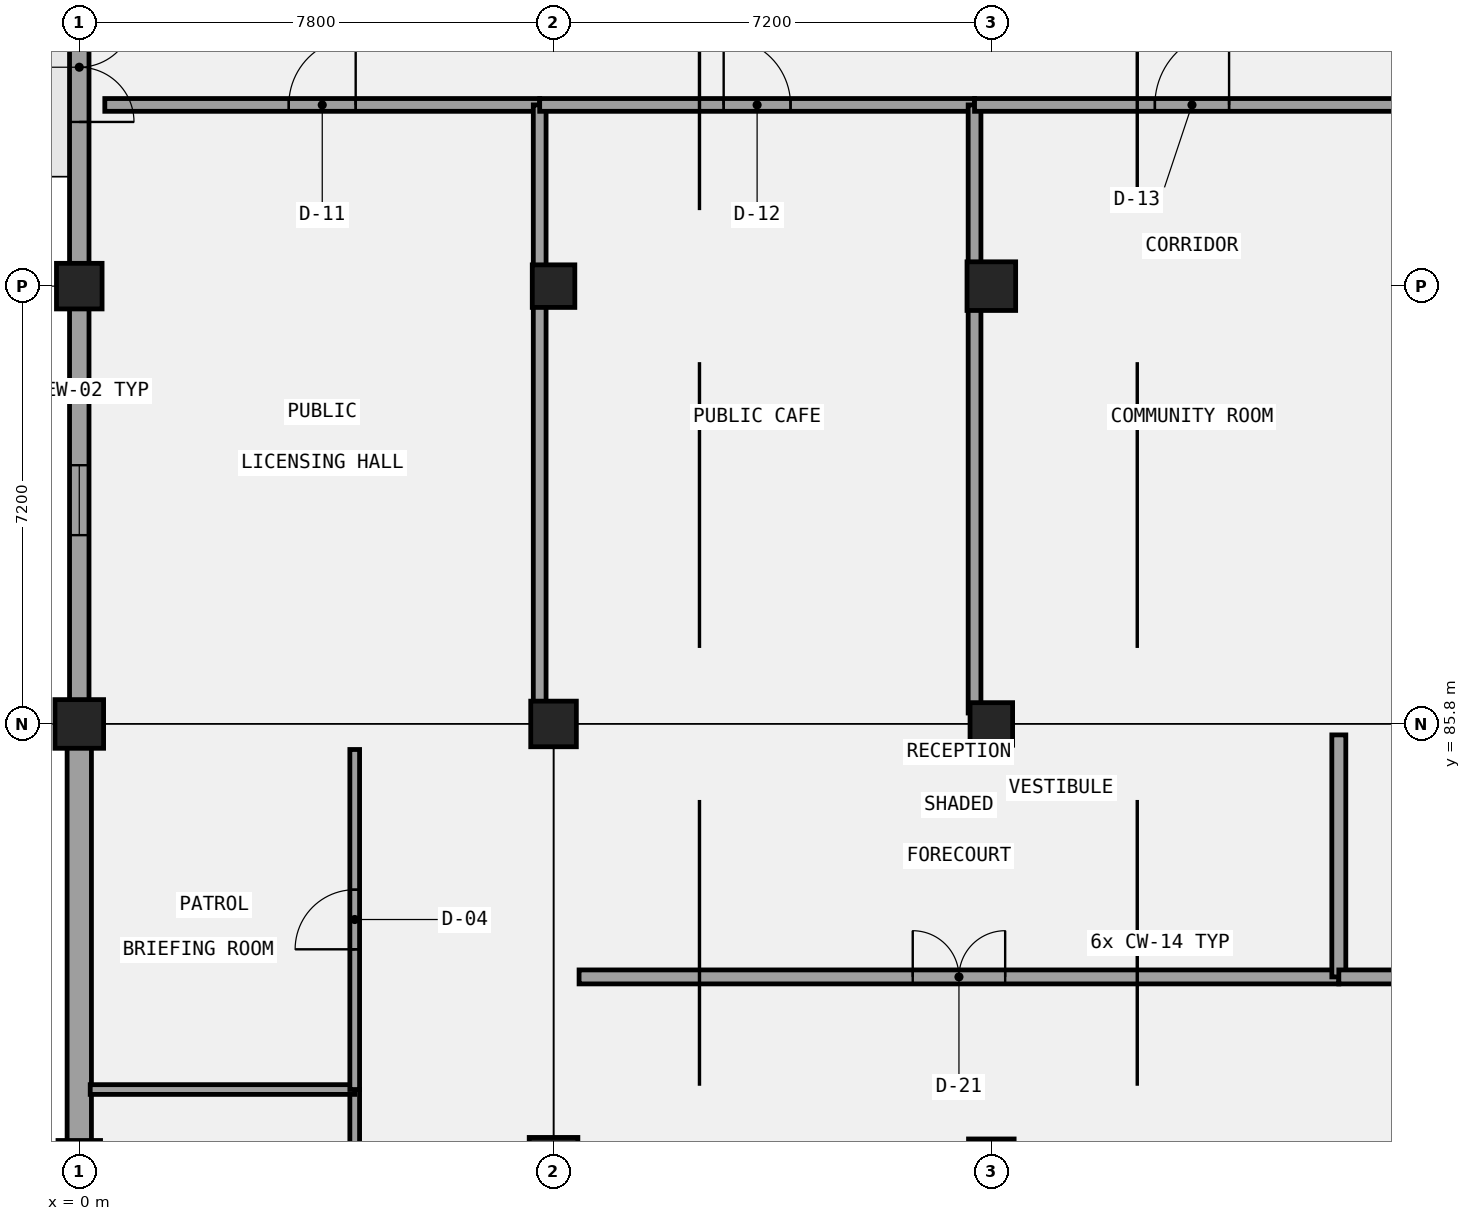
"""IFC4 building model, lengths in metres.
Left out: names, types, materials, properties, quantities, classifications, styles, units other than length and angle.
Written with IfcOpenShell. Run it as: python <this file> out.ifc"""

import sys

from ifc_helpers import new_model, si_unit, direction, frame, frame_2d, origin, origin_2d, place, context, subcontext, project, spatial, rectangle, extrude, element, fill, save


model = new_model("IFC4")
c1 = context("Model", 3, precision=1e-05, world=origin(), true_north=direction((0.0, 1.0)))
c2 = subcontext(c1, "Body", "Model", "MODEL_VIEW")
j1 = project(units=[si_unit("LENGTHUNIT", "METRE"), si_unit("PLANEANGLEUNIT", "RADIAN")], contexts=[c1])
p1 = place(None, origin())
s1 = spatial("IfcSite", under=j1, at=p1, CompositionType="ELEMENT")
p2 = place(p1, origin())
s2 = spatial("IfcBuilding", under=s1, at=p2, CompositionType="ELEMENT")
p3 = place(p2, origin())
s3 = spatial("IfcBuildingStorey", under=s2, at=p3, CompositionType="ELEMENT", Elevation=0.0)
p4 = place(p3, frame((0.0, 78.6, -0.32), z_axis=(0.0, 0.0, 1.0), x_axis=(1.0, 0.0, 0.0)))
e1 = element("IfcColumn", 1, at=p4, inside=s3, PredefinedType="COLUMN", context=c2, shape_type="SweptSolid", body=[
    extrude(rectangle(XDim=0.7, YDim=0.7, at=origin_2d()), origin(), (0.0, 0.0, 1.0), 5.72),
])
p5 = place(p3, frame((0.0, 85.8, -0.32), z_axis=(0.0, 0.0, 1.0), x_axis=(1.0, 0.0, 0.0)))
e2 = element("IfcColumn", 2, at=p5, inside=s3, PredefinedType="COLUMN", context=c2, shape_type="SweptSolid", body=[
    extrude(rectangle(XDim=0.8, YDim=0.8, at=origin_2d()), origin(), (0.0, 0.0, 1.0), 5.72),
])
p6 = place(p3, frame((0.0, 93.0, -0.32), z_axis=(0.0, 0.0, 1.0), x_axis=(1.0, 0.0, 0.0)))
e3 = element("IfcColumn", 3, at=p6, inside=s3, PredefinedType="COLUMN", context=c2, shape_type="SweptSolid", body=[
    extrude(rectangle(XDim=0.75, YDim=0.75, at=origin_2d()), origin(), (0.0, 0.0, 1.0), 5.72),
])
p7 = place(p3, frame((7.8, 78.6, 0.0), z_axis=(0.0, 0.0, 1.0), x_axis=(1.0, 0.0, 0.0)))
e4 = element("IfcColumn", 4, at=p7, inside=s3, PredefinedType="COLUMN", context=c2, shape_type="SweptSolid", body=[
    extrude(rectangle(XDim=0.8, YDim=0.8, at=origin_2d()), origin(), (0.0, 0.0, 1.0), 5.4),
])
p8 = place(p3, frame((7.8, 85.8, 0.0), z_axis=(0.0, 0.0, 1.0), x_axis=(1.0, 0.0, 0.0)))
e5 = element("IfcColumn", 5, at=p8, inside=s3, PredefinedType="COLUMN", context=c2, shape_type="SweptSolid", body=[
    extrude(rectangle(XDim=0.75, YDim=0.75, at=origin_2d()), origin(), (0.0, 0.0, 1.0), 5.4),
])
p9 = place(p3, frame((7.8, 93.0, -0.32), z_axis=(0.0, 0.0, 1.0), x_axis=(1.0, 0.0, 0.0)))
e6 = element("IfcColumn", 6, at=p9, inside=s3, PredefinedType="COLUMN", context=c2, shape_type="SweptSolid", body=[
    extrude(rectangle(XDim=0.7, YDim=0.7, at=origin_2d()), origin(), (0.0, 0.0, 1.0), 5.72),
])
p10 = place(p3, frame((15.0, 78.6, 0.0), z_axis=(0.0, 0.0, 1.0), x_axis=(1.0, 0.0, 0.0)))
e7 = element("IfcColumn", 7, at=p10, inside=s3, PredefinedType="COLUMN", context=c2, shape_type="SweptSolid", body=[
    extrude(rectangle(XDim=0.75, YDim=0.75, at=origin_2d()), origin(), (0.0, 0.0, 1.0), 5.4),
])
p11 = place(p3, frame((15.0, 85.8, 0.0), z_axis=(0.0, 0.0, 1.0), x_axis=(1.0, 0.0, 0.0)))
e8 = element("IfcColumn", 8, at=p11, inside=s3, PredefinedType="COLUMN", context=c2, shape_type="SweptSolid", body=[
    extrude(rectangle(XDim=0.7, YDim=0.7, at=origin_2d()), origin(), (0.0, 0.0, 1.0), 5.4),
])
p12 = place(p3, frame((15.0, 93.0, -0.32), z_axis=(0.0, 0.0, 1.0), x_axis=(1.0, 0.0, 0.0)))
e9 = element("IfcColumn", 9, at=p12, inside=s3, PredefinedType="COLUMN", context=c2, shape_type="SweptSolid", body=[
    extrude(rectangle(XDim=0.8, YDim=0.8, at=origin_2d()), origin(), (0.0, 0.0, 1.0), 5.72),
])
p13 = place(p3, frame((0.0, 107.24, 0.0), z_axis=(0.0, 0.0, 1.0), x_axis=(0.0, -1.0, 0.0)))
e10 = element("IfcWall", 10, at=p13, inside=s3, PredefinedType="SOLIDWALL", context=c2, shape_type="SweptSolid", body=[
    extrude(rectangle(XDim=21.28, YDim=0.32, at=frame_2d((10.64, 0.0))), origin(), (0.0, 0.0, 1.0), 4.37),
])
p14 = place(p13, frame((9.74, 0.0, 0.0)))
e11 = element("IfcOpeningElement", 11, at=p14, cuts=e10, PredefinedType="OPENING", context=c2, shape_type="SweptSolid", body=[
    extrude(rectangle(XDim=1.8, YDim=2.4, at=frame_2d((0.9, 1.2))), frame((0.0, 0.17, 0.0), z_axis=(0.0, -1.0, 0.0), x_axis=(1.0, 0.0, 0.0)), (0.0, 0.0, 1.0), 0.34),
])
p15 = place(p13, frame((17.185, 0.0, 1.0)))
e12 = element("IfcOpeningElement", 12, at=p15, cuts=e10, PredefinedType="OPENING", context=c2, shape_type="SweptSolid", body=[
    extrude(rectangle(XDim=1.15, YDim=2.15, at=frame_2d((0.575, 1.075))), frame((0.0, 0.17, 0.0), z_axis=(0.0, -1.0, 0.0), x_axis=(1.0, 0.0, 0.0)), (0.0, 0.0, 1.0), 0.34),
])
p16 = place(p13, frame((2.945, 0.0, 1.0)))
e13 = element("IfcOpeningElement", 13, at=p16, cuts=e10, PredefinedType="OPENING", context=c2, shape_type="SweptSolid", body=[
    extrude(rectangle(XDim=1.15, YDim=2.15, at=frame_2d((0.575, 1.075))), frame((0.0, 0.17, 0.0), z_axis=(0.0, -1.0, 0.0), x_axis=(1.0, 0.0, 0.0)), (0.0, 0.0, 1.0), 0.34),
])
p17 = place(p3, frame((0.0, 85.6, 0.0), z_axis=(0.0, 0.0, 1.0), x_axis=(0.0, -1.0, 0.0)))
e14 = element("IfcWall", 14, at=p17, inside=s3, PredefinedType="SOLIDWALL", context=c2, shape_type="SweptSolid", body=[
    extrude(rectangle(XDim=28.4, YDim=0.4, at=frame_2d((14.2, 0.0))), origin(), (0.0, 0.0, 1.0), 4.37),
])
p18 = place(p3, frame((0.42, 95.98, 0.0), z_axis=(0.0, 0.0, 1.0), x_axis=(1.0, 0.0, 0.0)))
e15 = element("IfcWall", 15, at=p18, inside=s3, PredefinedType="PARTITIONING", context=c2, shape_type="SweptSolid", body=[
    extrude(rectangle(XDim=7.152, YDim=0.21, at=frame_2d((3.576, 0.0))), origin(), (0.0, 0.0, 1.0), 5.12),
])
p19 = place(p18, frame((3.026, 0.0, 0.0)))
e16 = element("IfcOpeningElement", 16, at=p19, cuts=e15, PredefinedType="OPENING", context=c2, shape_type="SweptSolid", body=[
    extrude(rectangle(XDim=1.1, YDim=2.22, at=frame_2d((0.55, 1.11))), frame((0.0, 0.115, 0.0), z_axis=(0.0, -1.0, 0.0), x_axis=(1.0, 0.0, 0.0)), (0.0, 0.0, 1.0), 0.23),
])
p20 = place(p3, frame((7.572, 85.98, 0.0), z_axis=(0.0, 0.0, 1.0), x_axis=(0.0, 1.0, 0.0)))
e17 = element("IfcWall", 17, at=p20, inside=s3, PredefinedType="PARTITIONING", context=c2, shape_type="SweptSolid", body=[
    extrude(rectangle(XDim=10.0, YDim=0.21, at=frame_2d((5.0, 0.0))), origin(), (0.0, 0.0, 1.0), 4.52),
])
p21 = place(p3, frame((7.572, 95.98, 0.0), z_axis=(0.0, 0.0, 1.0), x_axis=(1.0, 0.0, 0.0)))
e18 = element("IfcWall", 18, at=p21, inside=s3, PredefinedType="PARTITIONING", context=c2, shape_type="SweptSolid", body=[
    extrude(rectangle(XDim=7.152, YDim=0.21, at=frame_2d((3.576, 0.0))), origin(), (0.0, 0.0, 1.0), 5.12),
])
p22 = place(p21, frame((3.026, 0.0, 0.0)))
e19 = element("IfcOpeningElement", 19, at=p22, cuts=e18, PredefinedType="OPENING", context=c2, shape_type="SweptSolid", body=[
    extrude(rectangle(XDim=1.1, YDim=2.35, at=frame_2d((0.55, 1.175))), frame((0.0, 0.115, 0.0), z_axis=(0.0, -1.0, 0.0), x_axis=(1.0, 0.0, 0.0)), (0.0, 0.0, 1.0), 0.23),
])
p23 = place(p3, frame((14.724, 85.98, 0.0), z_axis=(0.0, 0.0, 1.0), x_axis=(0.0, 1.0, 0.0)))
e20 = element("IfcWall", 20, at=p23, inside=s3, PredefinedType="PARTITIONING", context=c2, shape_type="SweptSolid", body=[
    extrude(rectangle(XDim=10.0, YDim=0.21, at=frame_2d((5.0, 0.0))), origin(), (0.0, 0.0, 1.0), 4.47),
])
p24 = place(p3, frame((14.724, 95.98, 0.0), z_axis=(0.0, 0.0, 1.0), x_axis=(1.0, 0.0, 0.0)))
e21 = element("IfcWall", 21, at=p24, inside=s3, PredefinedType="PARTITIONING", context=c2, shape_type="SweptSolid", body=[
    extrude(rectangle(XDim=7.152, YDim=0.21, at=frame_2d((3.576, 0.0))), origin(), (0.0, 0.0, 1.0), 5.12),
])
p25 = place(p24, frame((2.966, 0.0, 0.0)))
e22 = element("IfcOpeningElement", 22, at=p25, cuts=e21, PredefinedType="OPENING", context=c2, shape_type="SweptSolid", body=[
    extrude(rectangle(XDim=1.22, YDim=2.1, at=frame_2d((0.61, 1.05))), frame((0.0, 0.115, 0.0), z_axis=(0.0, -1.0, 0.0), x_axis=(1.0, 0.0, 0.0)), (0.0, 0.0, 1.0), 0.23),
])
p26 = place(p3, frame((8.22, 81.64, 0.0), z_axis=(0.0, 0.0, 1.0), x_axis=(1.0, 0.0, 0.0)))
e23 = element("IfcWall", 23, at=p26, inside=s3, PredefinedType="PARTITIONING", context=c2, shape_type="SweptSolid", body=[
    extrude(rectangle(XDim=12.495, YDim=0.23, at=frame_2d((6.248, 0.0))), origin(), (0.0, 0.0, 1.0), 5.12),
])
p27 = place(p26, frame((5.488, 0.0, 0.0)))
e24 = element("IfcOpeningElement", 24, at=p27, cuts=e23, PredefinedType="OPENING", context=c2, shape_type="SweptSolid", body=[
    extrude(rectangle(XDim=1.52, YDim=2.35, at=frame_2d((0.76, 1.175))), frame((0.0, 0.125, 0.0), z_axis=(0.0, -1.0, 0.0), x_axis=(1.0, 0.0, 0.0)), (0.0, 0.0, 1.0), 0.25),
])
p28 = place(p3, frame((20.715, 81.64, 0.0), z_axis=(0.0, 0.0, 1.0), x_axis=(0.0, 1.0, 0.0)))
e25 = element("IfcWall", 25, at=p28, inside=s3, PredefinedType="PARTITIONING", context=c2, shape_type="SweptSolid", body=[
    extrude(rectangle(XDim=3.98, YDim=0.23, at=frame_2d((1.99, 0.0))), origin(), (0.0, 0.0, 1.0), 5.12),
])
p29 = place(p3, frame((20.715, 81.64, 0.0), z_axis=(0.0, 0.0, 1.0), x_axis=(1.0, 0.0, 0.0)))
e26 = element("IfcWall", 26, at=p29, inside=s3, PredefinedType="PARTITIONING", context=c2, shape_type="SweptSolid", body=[
    extrude(rectangle(XDim=12.495, YDim=0.23, at=frame_2d((6.248, 0.0))), origin(), (0.0, 0.0, 1.0), 5.12),
])
p30 = place(p29, frame((5.387, 0.0, 0.0)))
e27 = element("IfcOpeningElement", 27, at=p30, cuts=e26, PredefinedType="OPENING", context=c2, shape_type="SweptSolid", body=[
    extrude(rectangle(XDim=1.72, YDim=2.1, at=frame_2d((0.86, 1.05))), frame((0.0, 0.125, 0.0), z_axis=(0.0, -1.0, 0.0), x_axis=(1.0, 0.0, 0.0)), (0.0, 0.0, 1.0), 0.25),
])
p31 = place(p3, frame((4.53, 74.196, 0.0), z_axis=(0.0, 0.0, 1.0), x_axis=(0.0, 1.0, 0.0)))
e28 = element("IfcWall", 28, at=p31, inside=s3, PredefinedType="PARTITIONING", context=c2, shape_type="SweptSolid", body=[
    extrude(rectangle(XDim=5.592, YDim=0.16, at=frame_2d((2.796, 0.0))), origin(), (0.0, 0.0, 1.0), 5.12),
])
p32 = place(p31, frame((2.336, 0.0, 0.0)))
e29 = element("IfcOpeningElement", 29, at=p32, cuts=e28, PredefinedType="OPENING", context=c2, shape_type="SweptSolid", body=[
    extrude(rectangle(XDim=0.92, YDim=2.35, at=frame_2d((0.46, 1.175))), frame((0.0, 0.09, 0.0), z_axis=(0.0, -1.0, 0.0), x_axis=(1.0, 0.0, 0.0)), (0.0, 0.0, 1.0), 0.18),
])
p33 = place(p3, frame((0.18, 79.788, 0.0), z_axis=(0.0, 0.0, 1.0), x_axis=(1.0, 0.0, 0.0)))
e30 = element("IfcWall", 30, at=p33, inside=s3, PredefinedType="PARTITIONING", context=c2, shape_type="SweptSolid", body=[
    extrude(rectangle(XDim=4.35, YDim=0.16, at=frame_2d((2.175, 0.0))), origin(), (0.0, 0.0, 1.0), 5.12),
])
p34 = place(p3, frame((4.53, 79.788, 0.0), z_axis=(0.0, 0.0, 1.0), x_axis=(0.0, 1.0, 0.0)))
e31 = element("IfcWall", 31, at=p34, inside=s3, PredefinedType="PARTITIONING", context=c2, shape_type="SweptSolid", body=[
    extrude(rectangle(XDim=5.592, YDim=0.16, at=frame_2d((2.796, 0.0))), origin(), (0.0, 0.0, 1.0), 5.12),
])
p35 = place(p34, frame((2.306, 0.0, 0.0)))
e32 = element("IfcOpeningElement", 32, at=p35, cuts=e31, PredefinedType="OPENING", context=c2, shape_type="SweptSolid", body=[
    extrude(rectangle(XDim=0.98, YDim=2.1, at=frame_2d((0.49, 1.05))), frame((0.0, 0.09, 0.0), z_axis=(0.0, -1.0, 0.0), x_axis=(1.0, 0.0, 0.0)), (0.0, 0.0, 1.0), 0.18),
])
p36 = place(p14, frame((1.8, 0.0, 0.0), z_axis=(0.0, 0.0, 1.0), x_axis=(-1.0, 0.0, 0.0)))
e33 = element("IfcDoor", 33, at=p36, inside=s3, OperationType="DOUBLE_DOOR_SINGLE_SWING", PredefinedType="DOOR", context=c2, shape_type="SweptSolid", body=[
    extrude(rectangle(XDim=1.8, YDim=2.4, at=frame_2d((0.9, 1.2))), frame((0.0, 0.025, 0.0), z_axis=(0.0, -1.0, 0.0), x_axis=(1.0, 0.0, 0.0)), (0.0, 0.0, 1.0), 0.05),
])
fill(e11, e33)
p37 = place(p15, origin())
e34 = element("IfcWindow", 34, at=p37, inside=s3, PartitioningType="SINGLE_PANEL", PredefinedType="WINDOW", context=c2, shape_type="SweptSolid", body=[
    extrude(rectangle(XDim=1.15, YDim=2.15, at=frame_2d((0.575, 1.075))), frame((0.0, 0.03, 0.0), z_axis=(0.0, -1.0, 0.0), x_axis=(1.0, 0.0, 0.0)), (0.0, 0.0, 1.0), 0.06),
])
fill(e12, e34)
p38 = place(p19, frame((1.1, 0.0, 0.0), z_axis=(0.0, 0.0, 1.0), x_axis=(-1.0, 0.0, 0.0)))
e35 = element("IfcDoor", 35, at=p38, inside=s3, OperationType="SINGLE_SWING_RIGHT", PredefinedType="DOOR", context=c2, shape_type="SweptSolid", body=[
    extrude(rectangle(XDim=1.1, YDim=2.22, at=frame_2d((0.55, 1.11))), frame((0.0, 0.025, 0.0), z_axis=(0.0, -1.0, 0.0), x_axis=(1.0, 0.0, 0.0)), (0.0, 0.0, 1.0), 0.05),
])
fill(e16, e35)
p39 = place(p22, frame((1.1, 0.0, 0.0), z_axis=(0.0, 0.0, 1.0), x_axis=(-1.0, 0.0, 0.0)))
e36 = element("IfcDoor", 36, at=p39, inside=s3, OperationType="SINGLE_SWING_LEFT", PredefinedType="DOOR", context=c2, shape_type="SweptSolid", body=[
    extrude(rectangle(XDim=1.1, YDim=2.35, at=frame_2d((0.55, 1.175))), frame((0.0, 0.025, 0.0), z_axis=(0.0, -1.0, 0.0), x_axis=(1.0, 0.0, 0.0)), (0.0, 0.0, 1.0), 0.05),
])
fill(e19, e36)
p40 = place(p25, frame((1.22, 0.0, 0.0), z_axis=(0.0, 0.0, 1.0), x_axis=(-1.0, 0.0, 0.0)))
e37 = element("IfcDoor", 37, at=p40, inside=s3, OperationType="SINGLE_SWING_RIGHT", PredefinedType="DOOR", context=c2, shape_type="SweptSolid", body=[
    extrude(rectangle(XDim=1.22, YDim=2.1, at=frame_2d((0.61, 1.05))), frame((0.0, 0.025, 0.0), z_axis=(0.0, -1.0, 0.0), x_axis=(1.0, 0.0, 0.0)), (0.0, 0.0, 1.0), 0.05),
])
fill(e22, e37)
p41 = place(p27, origin())
e38 = element("IfcDoor", 38, at=p41, inside=s3, OperationType="DOUBLE_DOOR_SINGLE_SWING", PredefinedType="DOOR", context=c2, shape_type="SweptSolid", body=[
    extrude(rectangle(XDim=1.52, YDim=2.35, at=frame_2d((0.76, 1.175))), frame((0.0, 0.025, 0.0), z_axis=(0.0, -1.0, 0.0), x_axis=(1.0, 0.0, 0.0)), (0.0, 0.0, 1.0), 0.05),
])
fill(e24, e38)
p42 = place(p35, frame((0.98, 0.0, 0.0), z_axis=(0.0, 0.0, 1.0), x_axis=(-1.0, 0.0, 0.0)))
e39 = element("IfcDoor", 39, at=p42, inside=s3, OperationType="SINGLE_SWING_LEFT", PredefinedType="DOOR", context=c2, shape_type="SweptSolid", body=[
    extrude(rectangle(XDim=0.98, YDim=2.1, at=frame_2d((0.49, 1.05))), frame((0.0, 0.025, 0.0), z_axis=(0.0, -1.0, 0.0), x_axis=(1.0, 0.0, 0.0)), (0.0, 0.0, 1.0), 0.05),
])
fill(e32, e39)
save(model, sys.argv[1])
